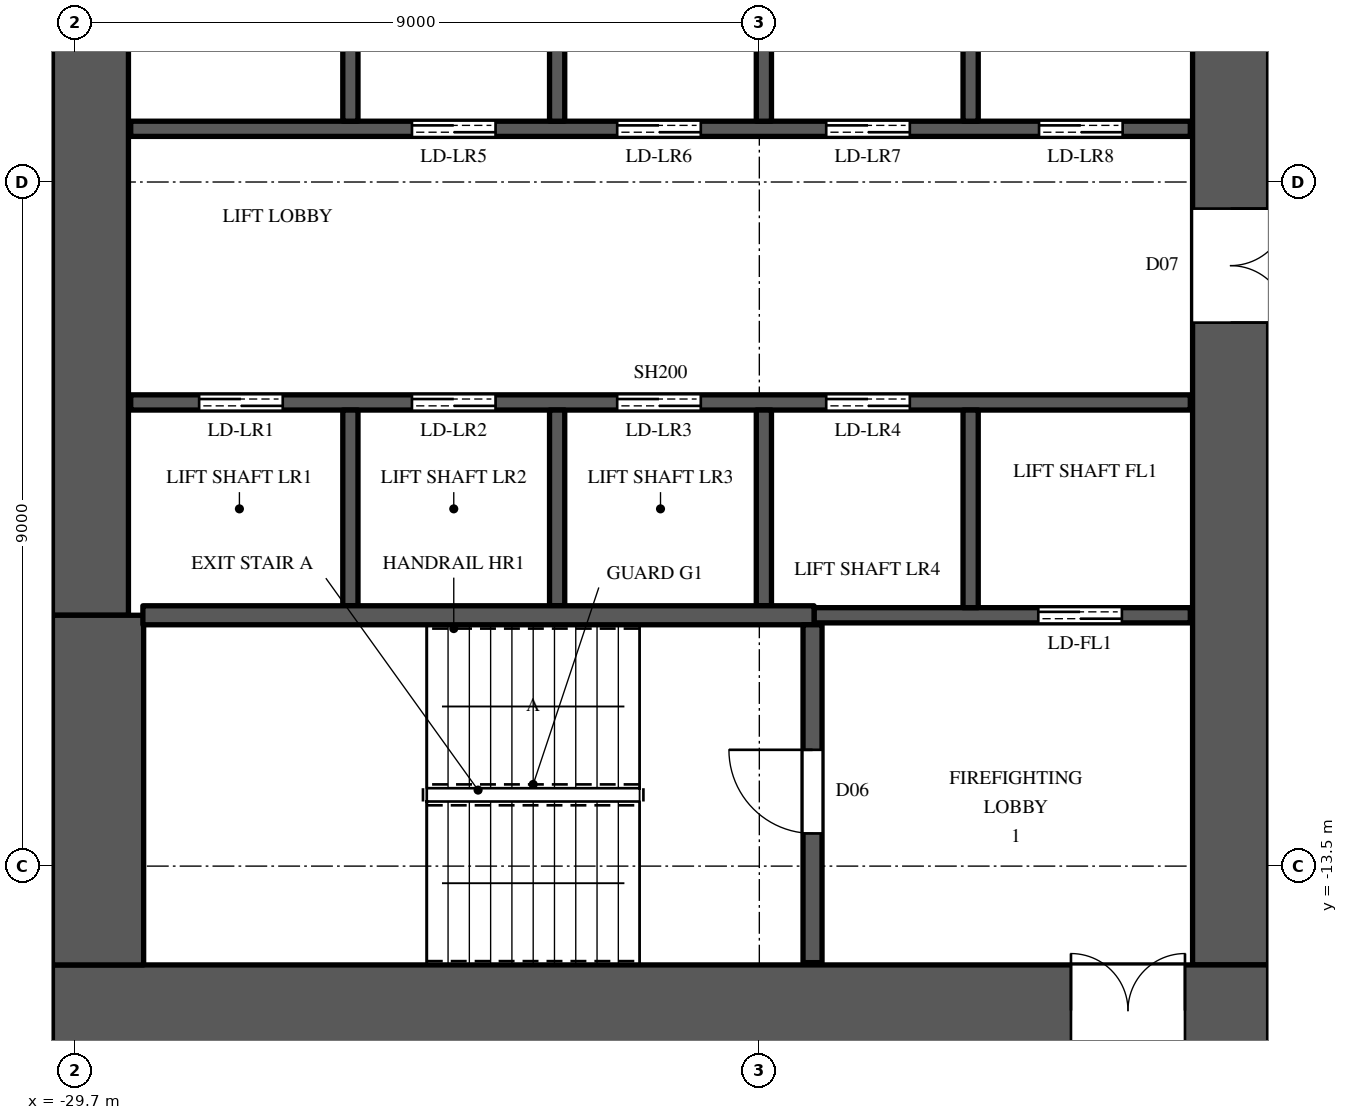
"""IFC4 building model, lengths in metres.
Left out: names, types, materials, properties, quantities, classifications, styles, units other than length and angle.
Written with IfcOpenShell. Run it as: python <this file> out.ifc"""

import sys

from ifc_helpers import new_model, si_unit, direction, frame, frame_2d, origin, place, context, subcontext, project, spatial, rectangle, extrude, element, fill, save


model = new_model("IFC4")
c1 = context("Model", 3, precision=1e-05, world=origin(), true_north=direction((0.0, 1.0)))
c2 = subcontext(c1, "Body", "Model", "MODEL_VIEW")
j1 = project(units=[si_unit("LENGTHUNIT", "METRE"), si_unit("PLANEANGLEUNIT", "RADIAN")], contexts=[c1])
p1 = place(None, origin())
s1 = spatial("IfcSite", under=j1, at=p1, CompositionType="ELEMENT")
p2 = place(p1, origin())
s2 = spatial("IfcBuilding", under=s1, at=p2, CompositionType="ELEMENT")
p3 = place(p2, frame((0.0, 0.0, 116.7)))
s3 = spatial("IfcBuildingStorey", under=s2, at=p3, CompositionType="ELEMENT", Elevation=116.7)
p4 = place(p3, frame((-30.0, -15.4, 0.0), z_axis=(0.0, 0.0, 1.0), x_axis=(1.0, 0.0, 0.0)))
e1 = element("IfcWall", 1, at=p4, inside=s3, PredefinedType="SHEAR", context=c2, shape_type="SweptSolid", body=[
    extrude(rectangle(XDim=16.0, YDim=1.2, at=frame_2d((8.0, 0.0))), origin(), (0.0, 0.0, 1.0), 3.6),
])
p5 = place(p4, frame((13.4, 0.0, 0.0)))
e2 = element("IfcOpeningElement", 2, at=p5, cuts=e1, PredefinedType="OPENING", context=c2, shape_type="SweptSolid", body=[
    extrude(rectangle(XDim=1.5, YDim=2.4, at=frame_2d((0.75, 1.2))), frame((0.0, 0.61, 0.0), z_axis=(0.0, -1.0, 0.0), x_axis=(1.0, 0.0, 0.0)), (0.0, 0.0, 1.0), 1.22),
])
p6 = place(p3, frame((-14.5, -14.8, 0.0), z_axis=(0.0, 0.0, 1.0), x_axis=(0.0, 1.0, 0.0)))
e3 = element("IfcWall", 3, at=p6, inside=s3, PredefinedType="SHEAR", context=c2, shape_type="SweptSolid", body=[
    extrude(rectangle(XDim=29.6, YDim=1.0, at=frame_2d((14.8, 0.0))), origin(), (0.0, 0.0, 1.0), 3.6),
])
p7 = place(p6, frame((8.45, 0.0, 0.0)))
e4 = element("IfcOpeningElement", 4, at=p7, cuts=e3, PredefinedType="OPENING", context=c2, shape_type="SweptSolid", body=[
    extrude(rectangle(XDim=1.5, YDim=2.4, at=frame_2d((0.75, 1.2))), frame((0.0, 0.51, 0.0), z_axis=(0.0, -1.0, 0.0), x_axis=(1.0, 0.0, 0.0)), (0.0, 0.0, 1.0), 1.02),
])
p8 = place(p6, frame((19.65, 0.0, 0.0)))
e5 = element("IfcOpeningElement", 5, at=p8, cuts=e3, PredefinedType="OPENING", context=c2, shape_type="SweptSolid", body=[
    extrude(rectangle(XDim=1.5, YDim=2.4, at=frame_2d((0.75, 1.2))), frame((0.0, 0.51, 0.0), z_axis=(0.0, -1.0, 0.0), x_axis=(1.0, 0.0, 0.0)), (0.0, 0.0, 1.0), 1.02),
])
p9 = place(p6, frame((14.5, 0.0, 0.0)))
e6 = element("IfcOpeningElement", 6, at=p9, cuts=e3, PredefinedType="OPENING", context=c2, shape_type="SweptSolid", body=[
    extrude(rectangle(XDim=0.6, YDim=2.0, at=frame_2d((0.3, 1.0))), frame((0.0, 0.51, 0.0), z_axis=(0.0, -1.0, 0.0), x_axis=(1.0, 0.0, 0.0)), (0.0, 0.0, 1.0), 1.02),
])
p10 = place(p3, frame((-29.5, -10.2, 0.0), z_axis=(0.0, 0.0, 1.0), x_axis=(0.0, 1.0, 0.0)))
e7 = element("IfcWall", 7, at=p10, inside=s3, PredefinedType="SHEAR", context=c2, shape_type="SweptSolid", body=[
    extrude(rectangle(XDim=20.4, YDim=1.0, at=frame_2d((10.2, 0.0))), origin(), (0.0, 0.0, 1.0), 3.6),
])
p11 = place(p3, frame((-29.4, -14.8, 0.0), z_axis=(0.0, 0.0, 1.0), x_axis=(0.0, 1.0, 0.0)))
e8 = element("IfcWall", 8, at=p11, inside=s3, PredefinedType="SHEAR", context=c2, shape_type="SweptSolid", body=[
    extrude(rectangle(XDim=4.6, YDim=1.2, at=frame_2d((2.3, 0.0))), origin(), (0.0, 0.0, 1.0), 3.6),
])
p12 = place(p3, frame((-28.97, -7.4, 0.0), z_axis=(0.0, 0.0, 1.0), x_axis=(1.0, 0.0, 0.0)))
e9 = element("IfcWall", 9, at=p12, inside=s3, PredefinedType="SHEAR", context=c2, shape_type="SweptSolid", body=[
    extrude(rectangle(XDim=13.94, YDim=0.2, at=frame_2d((6.97, 0.0))), origin(), (0.0, 0.0, 1.0), 3.3),
])
p13 = place(p12, frame((0.9, 0.0, 0.0)))
e10 = element("IfcOpeningElement", 10, at=p13, cuts=e9, PredefinedType="OPENING", context=c2, shape_type="SweptSolid", body=[
    extrude(rectangle(XDim=1.1, YDim=2.2, at=frame_2d((0.55, 1.1))), frame((0.0, 0.11, 0.0), z_axis=(0.0, -1.0, 0.0), x_axis=(1.0, 0.0, 0.0)), (0.0, 0.0, 1.0), 0.22),
])
p14 = place(p12, frame((3.7, 0.0, 0.0)))
e11 = element("IfcOpeningElement", 11, at=p14, cuts=e9, PredefinedType="OPENING", context=c2, shape_type="SweptSolid", body=[
    extrude(rectangle(XDim=1.1, YDim=2.2, at=frame_2d((0.55, 1.1))), frame((0.0, 0.11, 0.0), z_axis=(0.0, -1.0, 0.0), x_axis=(1.0, 0.0, 0.0)), (0.0, 0.0, 1.0), 0.22),
])
p15 = place(p12, frame((6.4, 0.0, 0.0)))
e12 = element("IfcOpeningElement", 12, at=p15, cuts=e9, PredefinedType="OPENING", context=c2, shape_type="SweptSolid", body=[
    extrude(rectangle(XDim=1.1, YDim=2.2, at=frame_2d((0.55, 1.1))), frame((0.0, 0.11, 0.0), z_axis=(0.0, -1.0, 0.0), x_axis=(1.0, 0.0, 0.0)), (0.0, 0.0, 1.0), 0.22),
])
p16 = place(p12, frame((9.15, 0.0, 0.0)))
e13 = element("IfcOpeningElement", 13, at=p16, cuts=e9, PredefinedType="OPENING", context=c2, shape_type="SweptSolid", body=[
    extrude(rectangle(XDim=1.1, YDim=2.2, at=frame_2d((0.55, 1.1))), frame((0.0, 0.11, 0.0), z_axis=(0.0, -1.0, 0.0), x_axis=(1.0, 0.0, 0.0)), (0.0, 0.0, 1.0), 0.22),
])
p17 = place(p3, frame((-28.97, -3.8, 0.0), z_axis=(0.0, 0.0, 1.0), x_axis=(1.0, 0.0, 0.0)))
e14 = element("IfcWall", 14, at=p17, inside=s3, PredefinedType="SHEAR", context=c2, shape_type="SweptSolid", body=[
    extrude(rectangle(XDim=13.94, YDim=0.2, at=frame_2d((6.97, 0.0))), origin(), (0.0, 0.0, 1.0), 3.3),
])
p18 = place(p17, frame((3.7, 0.0, 0.0)))
e15 = element("IfcOpeningElement", 15, at=p18, cuts=e14, PredefinedType="OPENING", context=c2, shape_type="SweptSolid", body=[
    extrude(rectangle(XDim=1.1, YDim=2.2, at=frame_2d((0.55, 1.1))), frame((0.0, 0.11, 0.0), z_axis=(0.0, -1.0, 0.0), x_axis=(1.0, 0.0, 0.0)), (0.0, 0.0, 1.0), 0.22),
])
p19 = place(p17, frame((6.4, 0.0, 0.0)))
e16 = element("IfcOpeningElement", 16, at=p19, cuts=e14, PredefinedType="OPENING", context=c2, shape_type="SweptSolid", body=[
    extrude(rectangle(XDim=1.1, YDim=2.2, at=frame_2d((0.55, 1.1))), frame((0.0, 0.11, 0.0), z_axis=(0.0, -1.0, 0.0), x_axis=(1.0, 0.0, 0.0)), (0.0, 0.0, 1.0), 0.22),
])
p20 = place(p17, frame((9.15, 0.0, 0.0)))
e17 = element("IfcOpeningElement", 17, at=p20, cuts=e14, PredefinedType="OPENING", context=c2, shape_type="SweptSolid", body=[
    extrude(rectangle(XDim=1.1, YDim=2.2, at=frame_2d((0.55, 1.1))), frame((0.0, 0.11, 0.0), z_axis=(0.0, -1.0, 0.0), x_axis=(1.0, 0.0, 0.0)), (0.0, 0.0, 1.0), 0.22),
])
p21 = place(p17, frame((11.95, 0.0, 0.0)))
e18 = element("IfcOpeningElement", 18, at=p21, cuts=e14, PredefinedType="OPENING", context=c2, shape_type="SweptSolid", body=[
    extrude(rectangle(XDim=1.1, YDim=2.2, at=frame_2d((0.55, 1.1))), frame((0.0, 0.11, 0.0), z_axis=(0.0, -1.0, 0.0), x_axis=(1.0, 0.0, 0.0)), (0.0, 0.0, 1.0), 0.22),
])
p22 = place(p3, frame((-26.08, -10.075, 0.0), z_axis=(0.0, 0.0, 1.0), x_axis=(0.0, 1.0, 0.0)))
e19 = element("IfcWall", 19, at=p22, inside=s3, PredefinedType="SHEAR", context=c2, shape_type="SweptSolid", body=[
    extrude(rectangle(XDim=2.575, YDim=0.2, at=frame_2d((1.288, 0.0))), origin(), (0.0, 0.0, 1.0), 3.6),
])
p23 = place(p3, frame((-26.08, -3.7, 0.0), z_axis=(0.0, 0.0, 1.0), x_axis=(0.0, 1.0, 0.0)))
e20 = element("IfcWall", 20, at=p23, inside=s3, PredefinedType="SHEAR", context=c2, shape_type="SweptSolid", body=[
    extrude(rectangle(XDim=2.6, YDim=0.2, at=frame_2d((1.3, 0.0))), origin(), (0.0, 0.0, 1.0), 3.6),
])
p24 = place(p3, frame((-23.36, -10.075, 0.0), z_axis=(0.0, 0.0, 1.0), x_axis=(0.0, 1.0, 0.0)))
e21 = element("IfcWall", 21, at=p24, inside=s3, PredefinedType="SHEAR", context=c2, shape_type="SweptSolid", body=[
    extrude(rectangle(XDim=2.575, YDim=0.2, at=frame_2d((1.288, 0.0))), origin(), (0.0, 0.0, 1.0), 3.6),
])
p25 = place(p3, frame((-23.36, -3.7, 0.0), z_axis=(0.0, 0.0, 1.0), x_axis=(0.0, 1.0, 0.0)))
e22 = element("IfcWall", 22, at=p25, inside=s3, PredefinedType="SHEAR", context=c2, shape_type="SweptSolid", body=[
    extrude(rectangle(XDim=2.6, YDim=0.2, at=frame_2d((1.3, 0.0))), origin(), (0.0, 0.0, 1.0), 3.6),
])
p26 = place(p3, frame((-20.64, -10.075, 0.0), z_axis=(0.0, 0.0, 1.0), x_axis=(0.0, 1.0, 0.0)))
e23 = element("IfcWall", 23, at=p26, inside=s3, PredefinedType="SHEAR", context=c2, shape_type="SweptSolid", body=[
    extrude(rectangle(XDim=2.575, YDim=0.2, at=frame_2d((1.288, 0.0))), origin(), (0.0, 0.0, 1.0), 3.6),
])
p27 = place(p3, frame((-20.64, -3.7, 0.0), z_axis=(0.0, 0.0, 1.0), x_axis=(0.0, 1.0, 0.0)))
e24 = element("IfcWall", 24, at=p27, inside=s3, PredefinedType="SHEAR", context=c2, shape_type="SweptSolid", body=[
    extrude(rectangle(XDim=2.6, YDim=0.2, at=frame_2d((1.3, 0.0))), origin(), (0.0, 0.0, 1.0), 3.6),
])
p28 = place(p3, frame((-19.98, -10.2, 0.0), z_axis=(0.0, 0.0, 1.0), x_axis=(1.0, 0.0, 0.0)))
e25 = element("IfcWall", 25, at=p28, inside=s3, PredefinedType="SHEAR", context=c2, shape_type="SweptSolid", body=[
    extrude(rectangle(XDim=4.95, YDim=0.2, at=frame_2d((2.475, 0.0))), origin(), (0.0, 0.0, 1.0), 3.3),
])
p29 = place(p28, frame((2.95, 0.0, 0.0)))
e26 = element("IfcOpeningElement", 26, at=p29, cuts=e25, PredefinedType="OPENING", context=c2, shape_type="SweptSolid", body=[
    extrude(rectangle(XDim=1.1, YDim=2.2, at=frame_2d((0.55, 1.1))), frame((0.0, 0.11, 0.0), z_axis=(0.0, -1.0, 0.0), x_axis=(1.0, 0.0, 0.0)), (0.0, 0.0, 1.0), 0.22),
])
p30 = place(p3, frame((-17.92, -10.1, 0.0), z_axis=(0.0, 0.0, 1.0), x_axis=(0.0, 1.0, 0.0)))
e27 = element("IfcWall", 27, at=p30, inside=s3, PredefinedType="SHEAR", context=c2, shape_type="SweptSolid", body=[
    extrude(rectangle(XDim=2.6, YDim=0.2, at=frame_2d((1.3, 0.0))), origin(), (0.0, 0.0, 1.0), 3.6),
])
p31 = place(p3, frame((-17.92, -3.7, 0.0), z_axis=(0.0, 0.0, 1.0), x_axis=(0.0, 1.0, 0.0)))
e28 = element("IfcWall", 28, at=p31, inside=s3, PredefinedType="SHEAR", context=c2, shape_type="SweptSolid", body=[
    extrude(rectangle(XDim=2.6, YDim=0.2, at=frame_2d((1.3, 0.0))), origin(), (0.0, 0.0, 1.0), 3.6),
])
p32 = place(p3, frame((-28.81, -10.2, 0.0), z_axis=(0.0, 0.0, 1.0), x_axis=(1.0, 0.0, 0.0)))
e29 = element("IfcWall", 29, at=p32, inside=s3, PredefinedType="SHEAR", context=c2, shape_type="SweptSolid", body=[
    extrude(rectangle(XDim=8.83, YDim=0.25, at=frame_2d((4.415, 0.0))), origin(), (0.0, 0.0, 1.0), 3.3),
])
p33 = place(p3, frame((-20.0, -14.77, 0.0), z_axis=(0.0, 0.0, 1.0), x_axis=(0.0, 1.0, 0.0)))
e30 = element("IfcWall", 30, at=p33, inside=s3, PredefinedType="SHEAR", context=c2, shape_type="SweptSolid", body=[
    extrude(rectangle(XDim=4.445, YDim=0.25, at=frame_2d((2.223, 0.0))), origin(), (0.0, 0.0, 1.0), 3.3),
])
p34 = place(p33, frame((1.7, 0.0, 0.0)))
e31 = element("IfcOpeningElement", 31, at=p34, cuts=e30, PredefinedType="OPENING", context=c2, shape_type="SweptSolid", body=[
    extrude(rectangle(XDim=1.1, YDim=2.2, at=frame_2d((0.55, 1.1))), frame((0.0, 0.135, 0.0), z_axis=(0.0, -1.0, 0.0), x_axis=(1.0, 0.0, 0.0)), (0.0, 0.0, 1.0), 0.27),
])
p35 = place(p34, origin())
e32 = element("IfcDoor", 32, at=p35, inside=s3, OperationType="SINGLE_SWING_RIGHT", PredefinedType="DOOR", context=c2, shape_type="SweptSolid", body=[
    extrude(rectangle(XDim=1.1, YDim=2.2, at=frame_2d((0.55, 1.1))), frame((0.0, 0.025, 0.0), z_axis=(0.0, -1.0, 0.0), x_axis=(1.0, 0.0, 0.0)), (0.0, 0.0, 1.0), 0.05),
])
fill(e31, e32)
p36 = place(p13, origin())
e33 = element("IfcDoor", 33, at=p36, inside=s3, OperationType="DOUBLE_DOOR_SLIDING", PredefinedType="DOOR", context=c2, shape_type="SweptSolid", body=[
    extrude(rectangle(XDim=1.1, YDim=2.2, at=frame_2d((0.55, 1.1))), frame((0.0, 0.025, 0.0), z_axis=(0.0, -1.0, 0.0), x_axis=(1.0, 0.0, 0.0)), (0.0, 0.0, 1.0), 0.05),
])
fill(e10, e33)
p37 = place(p14, origin())
e34 = element("IfcDoor", 34, at=p37, inside=s3, OperationType="DOUBLE_DOOR_SLIDING", PredefinedType="DOOR", context=c2, shape_type="SweptSolid", body=[
    extrude(rectangle(XDim=1.1, YDim=2.2, at=frame_2d((0.55, 1.1))), frame((0.0, 0.025, 0.0), z_axis=(0.0, -1.0, 0.0), x_axis=(1.0, 0.0, 0.0)), (0.0, 0.0, 1.0), 0.05),
])
fill(e11, e34)
p38 = place(p15, origin())
e35 = element("IfcDoor", 35, at=p38, inside=s3, OperationType="DOUBLE_DOOR_SLIDING", PredefinedType="DOOR", context=c2, shape_type="SweptSolid", body=[
    extrude(rectangle(XDim=1.1, YDim=2.2, at=frame_2d((0.55, 1.1))), frame((0.0, 0.025, 0.0), z_axis=(0.0, -1.0, 0.0), x_axis=(1.0, 0.0, 0.0)), (0.0, 0.0, 1.0), 0.05),
])
fill(e12, e35)
p39 = place(p16, origin())
e36 = element("IfcDoor", 36, at=p39, inside=s3, OperationType="DOUBLE_DOOR_SLIDING", PredefinedType="DOOR", context=c2, shape_type="SweptSolid", body=[
    extrude(rectangle(XDim=1.1, YDim=2.2, at=frame_2d((0.55, 1.1))), frame((0.0, 0.025, 0.0), z_axis=(0.0, -1.0, 0.0), x_axis=(1.0, 0.0, 0.0)), (0.0, 0.0, 1.0), 0.05),
])
fill(e13, e36)
p40 = place(p29, origin())
e37 = element("IfcDoor", 37, at=p40, inside=s3, OperationType="DOUBLE_DOOR_SLIDING", PredefinedType="DOOR", context=c2, shape_type="SweptSolid", body=[
    extrude(rectangle(XDim=1.1, YDim=2.2, at=frame_2d((0.55, 1.1))), frame((0.0, 0.025, 0.0), z_axis=(0.0, -1.0, 0.0), x_axis=(1.0, 0.0, 0.0)), (0.0, 0.0, 1.0), 0.05),
])
fill(e26, e37)
p41 = place(p18, origin())
e38 = element("IfcDoor", 38, at=p41, inside=s3, OperationType="DOUBLE_DOOR_SLIDING", PredefinedType="DOOR", context=c2, shape_type="SweptSolid", body=[
    extrude(rectangle(XDim=1.1, YDim=2.2, at=frame_2d((0.55, 1.1))), frame((0.0, 0.025, 0.0), z_axis=(0.0, -1.0, 0.0), x_axis=(1.0, 0.0, 0.0)), (0.0, 0.0, 1.0), 0.05),
])
fill(e15, e38)
p42 = place(p19, origin())
e39 = element("IfcDoor", 39, at=p42, inside=s3, OperationType="DOUBLE_DOOR_SLIDING", PredefinedType="DOOR", context=c2, shape_type="SweptSolid", body=[
    extrude(rectangle(XDim=1.1, YDim=2.2, at=frame_2d((0.55, 1.1))), frame((0.0, 0.025, 0.0), z_axis=(0.0, -1.0, 0.0), x_axis=(1.0, 0.0, 0.0)), (0.0, 0.0, 1.0), 0.05),
])
fill(e16, e39)
p43 = place(p20, origin())
e40 = element("IfcDoor", 40, at=p43, inside=s3, OperationType="DOUBLE_DOOR_SLIDING", PredefinedType="DOOR", context=c2, shape_type="SweptSolid", body=[
    extrude(rectangle(XDim=1.1, YDim=2.2, at=frame_2d((0.55, 1.1))), frame((0.0, 0.025, 0.0), z_axis=(0.0, -1.0, 0.0), x_axis=(1.0, 0.0, 0.0)), (0.0, 0.0, 1.0), 0.05),
])
fill(e17, e40)
p44 = place(p21, origin())
e41 = element("IfcDoor", 41, at=p44, inside=s3, OperationType="DOUBLE_DOOR_SLIDING", PredefinedType="DOOR", context=c2, shape_type="SweptSolid", body=[
    extrude(rectangle(XDim=1.1, YDim=2.2, at=frame_2d((0.55, 1.1))), frame((0.0, 0.025, 0.0), z_axis=(0.0, -1.0, 0.0), x_axis=(1.0, 0.0, 0.0)), (0.0, 0.0, 1.0), 0.05),
])
fill(e18, e41)
p45 = place(p5, origin())
e42 = element("IfcDoor", 42, at=p45, inside=s3, OperationType="DOUBLE_DOOR_SINGLE_SWING", PredefinedType="DOOR", context=c2, shape_type="SweptSolid", body=[
    extrude(rectangle(XDim=1.5, YDim=2.4, at=frame_2d((0.75, 1.2))), frame((0.0, 0.025, 0.0), z_axis=(0.0, -1.0, 0.0), x_axis=(1.0, 0.0, 0.0)), (0.0, 0.0, 1.0), 0.05),
])
fill(e2, e42)
p46 = place(p7, origin())
e43 = element("IfcDoor", 43, at=p46, inside=s3, OperationType="DOUBLE_DOOR_SINGLE_SWING", PredefinedType="DOOR", context=c2, shape_type="SweptSolid", body=[
    extrude(rectangle(XDim=1.5, YDim=2.4, at=frame_2d((0.75, 1.2))), frame((0.0, -0.445, 0.0), z_axis=(0.0, -1.0, 0.0), x_axis=(1.0, 0.0, 0.0)), (0.0, 0.0, 1.0), 0.05),
])
fill(e4, e43)
save(model, sys.argv[1])
